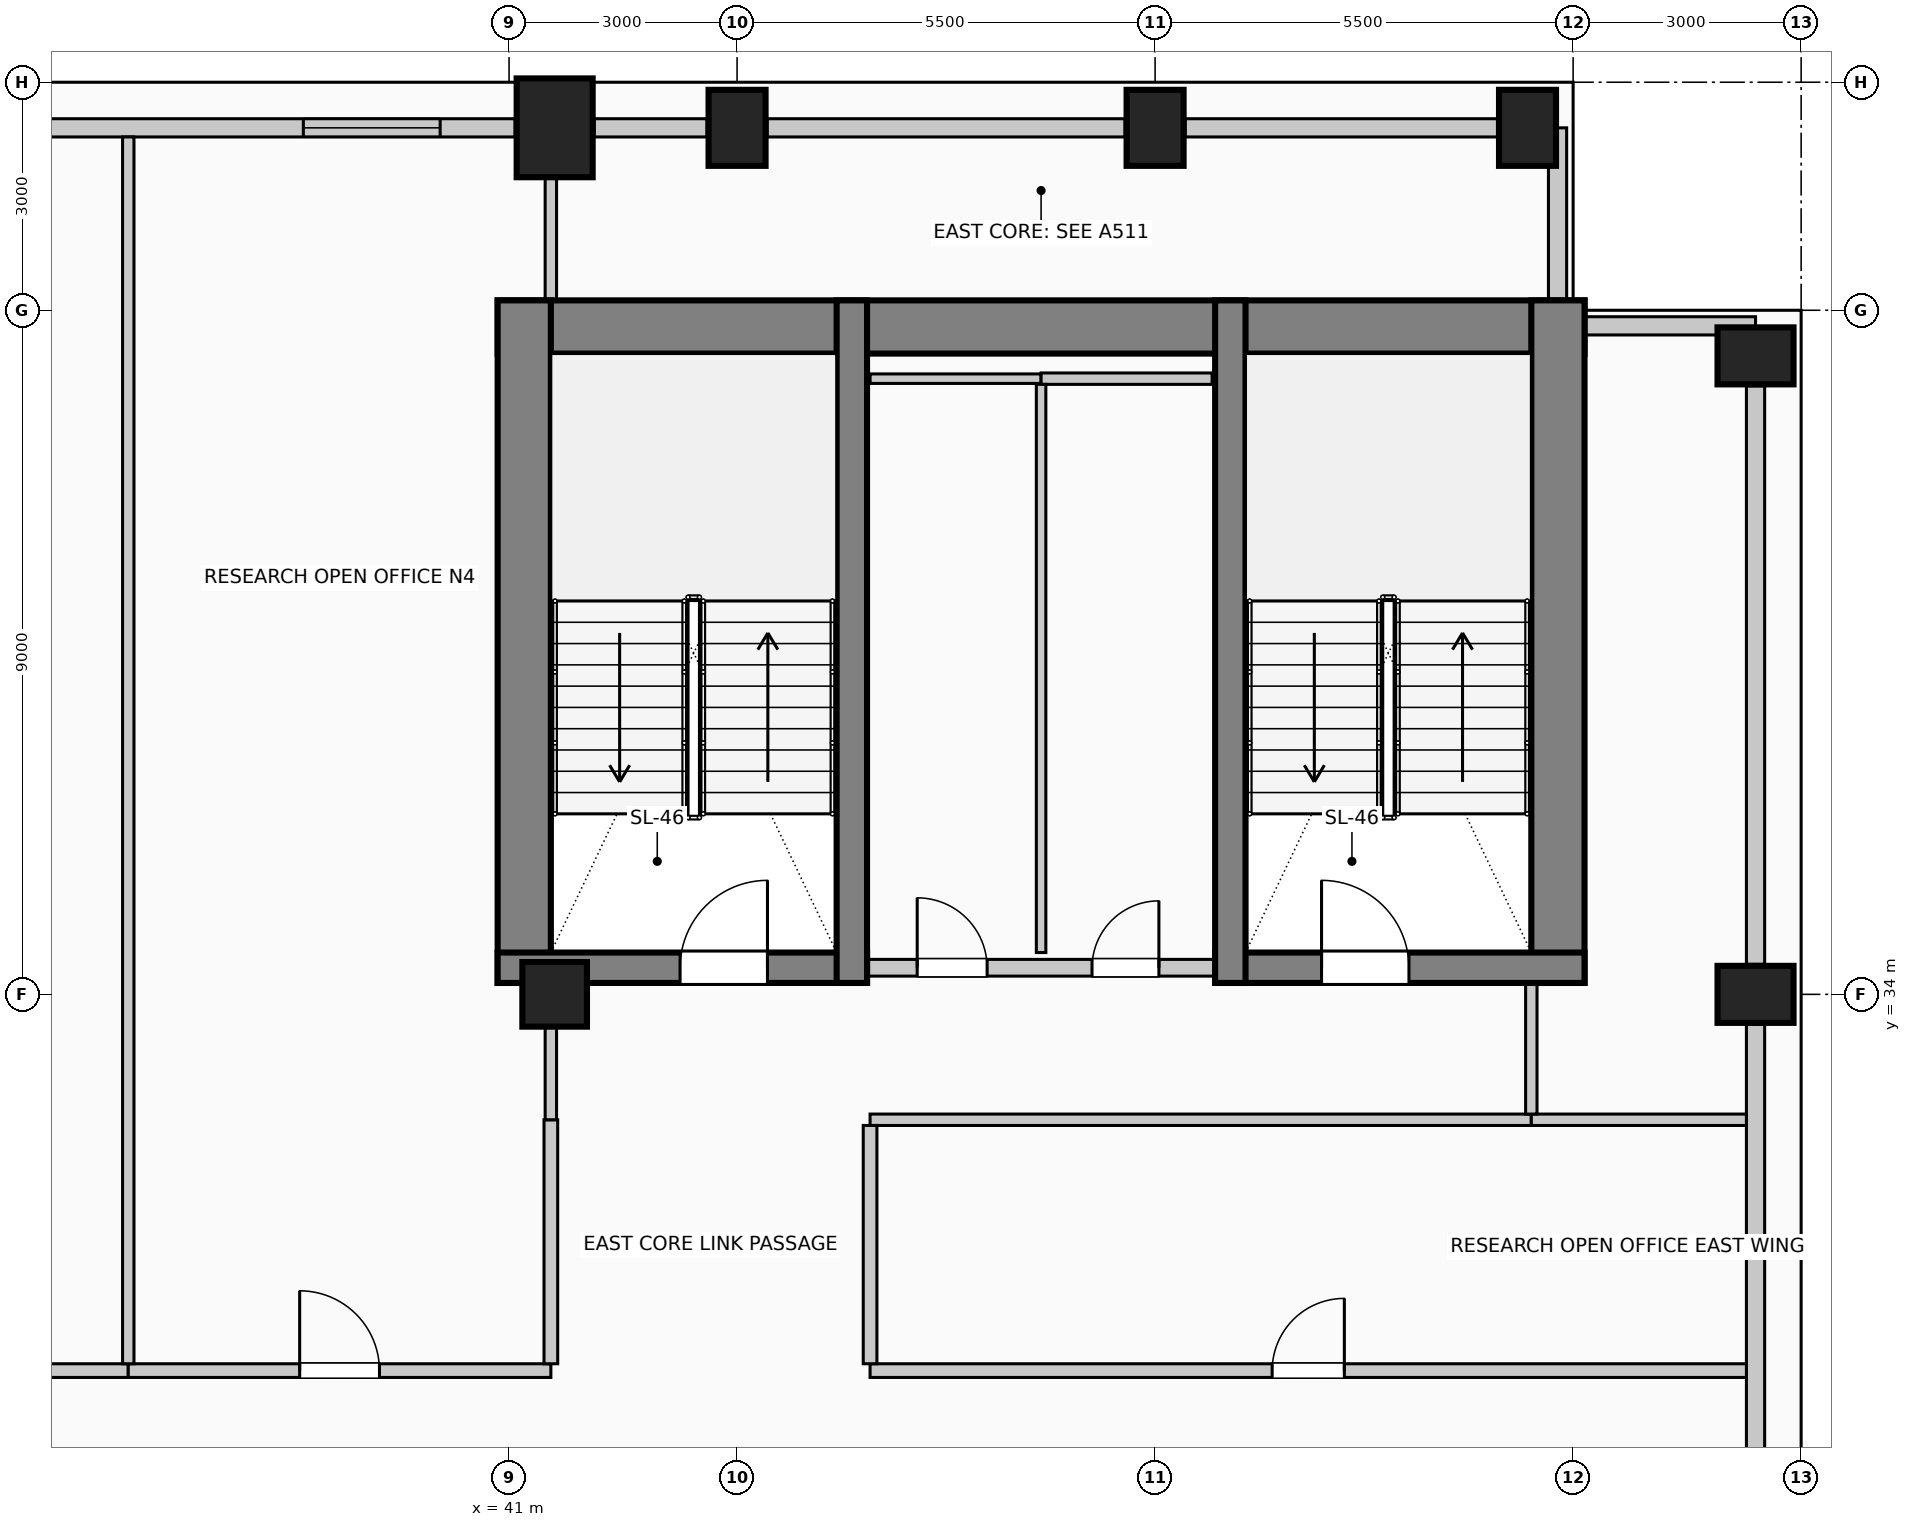
"""IFC4 building model, lengths in metres.
Left out: names, types, materials, properties, quantities, classifications, styles, units other than length and angle.
Written with IfcOpenShell. Run it as: python <this file> out.ifc"""

import sys

from ifc_helpers import new_model, si_unit, direction, frame, frame_2d, origin, origin_2d, place, context, subcontext, project, spatial, rectangle, circle, extrude, element, fill, save


model = new_model("IFC4")
c1 = context("Model", 3, precision=1e-05, world=origin(), true_north=direction((0.0, 1.0)))
c2 = subcontext(c1, "Body", "Model", "MODEL_VIEW")
j1 = project(units=[si_unit("LENGTHUNIT", "METRE"), si_unit("PLANEANGLEUNIT", "RADIAN")], contexts=[c1])
p1 = place(None, origin())
s1 = spatial("IfcSite", under=j1, at=p1, CompositionType="ELEMENT")
p2 = place(p1, origin())
s2 = spatial("IfcBuilding", under=s1, at=p2, CompositionType="ELEMENT")
p3 = place(p2, frame((0.0, 0.0, 222.6)))
s3 = spatial("IfcBuildingStorey", under=s2, at=p3, CompositionType="ELEMENT", Elevation=222.6)
p4 = place(p3, frame((40.85, 42.78, 0.0), z_axis=(0.0, 0.0, 1.0), x_axis=(1.0, 0.0, 0.0)))
e1 = element("IfcWall", 1, at=p4, inside=s3, PredefinedType="SHEAR", context=c2, shape_type="SweptSolid", body=[
    extrude(rectangle(XDim=14.3, YDim=0.7, at=frame_2d((7.15, 0.0))), origin(), (0.0, 0.0, 1.0), 4.0),
])
for number, where, z_axis, x_axis in (
    (2, (41.2, 34.15, 0.0), (0.0, 0.0, 1.0), (0.0, 1.0, 0.0)),
    (3, (54.8, 34.15, 0.0), (0.0, 0.0, 1.0), (0.0, 1.0, 0.0)),
):
    element("IfcWall", number, at=place(p3, frame(where, z_axis=z_axis, x_axis=x_axis)), inside=s3, PredefinedType="SHEAR", context=c2, shape_type="SweptSolid", body=[
        extrude(rectangle(XDim=8.98, YDim=0.7, at=frame_2d((4.49, 0.0))), origin(), (0.0, 0.0, 1.0), 4.0),
    ])
p5 = place(p3, frame((40.85, 34.35, 0.0), z_axis=(0.0, 0.0, 1.0), x_axis=(1.0, 0.0, 0.0)))
e4 = element("IfcWall", 4, at=p5, inside=s3, PredefinedType="SHEAR", context=c2, shape_type="SweptSolid", body=[
    extrude(rectangle(XDim=4.86, YDim=0.4, at=frame_2d((2.43, 0.0))), origin(), (0.0, 0.0, 1.0), 4.0),
])
p6 = place(p5, frame((2.4, 0.0, 0.0)))
e5 = element("IfcOpeningElement", 5, at=p6, cuts=e4, PredefinedType="OPENING", context=c2, shape_type="SweptSolid", body=[
    extrude(rectangle(XDim=1.15, YDim=2.2, at=frame_2d((0.575, 1.1))), frame((0.0, 0.21, 0.0), z_axis=(0.0, -1.0, 0.0), x_axis=(1.0, 0.0, 0.0)), (0.0, 0.0, 1.0), 0.42),
])
p7 = place(p3, frame((45.51, 34.15, 0.0), z_axis=(0.0, 0.0, 1.0), x_axis=(0.0, 1.0, 0.0)))
e6 = element("IfcWall", 6, at=p7, inside=s3, PredefinedType="SHEAR", context=c2, shape_type="SweptSolid", body=[
    extrude(rectangle(XDim=8.98, YDim=0.4, at=frame_2d((4.49, 0.0))), origin(), (0.0, 0.0, 1.0), 4.0),
])
p8 = place(p3, frame((50.29, 34.35, 0.0), z_axis=(0.0, 0.0, 1.0), x_axis=(1.0, 0.0, 0.0)))
e7 = element("IfcWall", 7, at=p8, inside=s3, PredefinedType="SHEAR", context=c2, shape_type="SweptSolid", body=[
    extrude(rectangle(XDim=4.86, YDim=0.4, at=frame_2d((2.43, 0.0))), origin(), (0.0, 0.0, 1.0), 4.0),
])
p9 = place(p8, frame((1.4, 0.0, 0.0)))
e8 = element("IfcOpeningElement", 8, at=p9, cuts=e7, PredefinedType="OPENING", context=c2, shape_type="SweptSolid", body=[
    extrude(rectangle(XDim=1.15, YDim=2.2, at=frame_2d((0.575, 1.1))), frame((0.0, 0.21, 0.0), z_axis=(0.0, -1.0, 0.0), x_axis=(1.0, 0.0, 0.0)), (0.0, 0.0, 1.0), 0.42),
])
p10 = place(p3, frame((50.49, 34.15, 0.0), z_axis=(0.0, 0.0, 1.0), x_axis=(0.0, 1.0, 0.0)))
e9 = element("IfcWall", 9, at=p10, inside=s3, PredefinedType="SHEAR", context=c2, shape_type="SweptSolid", body=[
    extrude(rectangle(XDim=8.98, YDim=0.4, at=frame_2d((4.49, 0.0))), origin(), (0.0, 0.0, 1.0), 4.0),
])
p11 = place(p3, frame((41.6, 45.4, 0.0), z_axis=(0.0, 0.0, 1.0), x_axis=(1.0, 0.0, 0.0)))
e10 = element("IfcColumn", 10, at=p11, inside=s3, PredefinedType="COLUMN", context=c2, shape_type="SweptSolid", body=[
    extrude(rectangle(XDim=1.0, YDim=1.3, at=origin_2d()), origin(), (0.0, 0.0, 1.0), 4.0),
])
for number, where, z_axis, x_axis in (
    (11, (44.0, 45.4, 0.0), (0.0, 0.0, 1.0), (1.0, 0.0, 0.0)),
    (12, (49.5, 45.4, 0.0), (0.0, 0.0, 1.0), (1.0, 0.0, 0.0)),
    (13, (54.4, 45.4, 0.0), (0.0, 0.0, 1.0), (1.0, 0.0, 0.0)),
    (14, (57.4, 34.0, 0.0), (0.0, 0.0, 1.0), (0.0, 1.0, 0.0)),
    (15, (57.4, 42.4, 0.0), (0.0, 0.0, 1.0), (0.0, 1.0, 0.0)),
):
    element("IfcColumn", number, at=place(p3, frame(where, z_axis=z_axis, x_axis=x_axis)), inside=s3, PredefinedType="COLUMN", context=c2, shape_type="SweptSolid", body=[
        extrude(rectangle(XDim=0.75, YDim=1.0, at=origin_2d()), origin(), (0.0, 0.0, 1.0), 4.0),
    ])
p12 = place(p3, frame((41.6, 34.0, 0.0), z_axis=(0.0, 0.0, 1.0), x_axis=(1.0, 0.0, 0.0)))
e16 = element("IfcColumn", 16, at=p12, inside=s3, PredefinedType="COLUMN", context=c2, shape_type="SweptSolid", body=[
    extrude(circle(Radius=0.425, at=origin_2d()), origin(), (0.0, 0.0, 1.0), 4.0),
])
p13 = place(p3, frame((34.52, 45.4, 0.0), z_axis=(0.0, 0.0, 1.0), x_axis=(1.0, 0.0, 0.0)))
e17 = element("IfcWall", 17, at=p13, inside=s3, PredefinedType="SOLIDWALL", context=c2, shape_type="SweptSolid", body=[
    extrude(rectangle(XDim=6.56, YDim=0.24, at=frame_2d((3.28, 0.0))), origin(), (0.0, 0.0, 1.0), 3.0),
])
p14 = place(p13, frame((3.773, 0.0, 0.42)))
e18 = element("IfcOpeningElement", 18, at=p14, cuts=e17, PredefinedType="OPENING", context=c2, shape_type="SweptSolid", body=[
    extrude(rectangle(XDim=1.8, YDim=2.2, at=frame_2d((0.9, 1.1))), frame((0.0, 0.13, 0.0), z_axis=(0.0, -1.0, 0.0), x_axis=(1.0, 0.0, 0.0)), (0.0, 0.0, 1.0), 0.26),
])
p15 = place(p3, frame((42.12, 45.4, 0.0), z_axis=(0.0, 0.0, 1.0), x_axis=(1.0, 0.0, 0.0)))
e19 = element("IfcWall", 19, at=p15, inside=s3, PredefinedType="SOLIDWALL", context=c2, shape_type="SweptSolid", body=[
    extrude(rectangle(XDim=1.485, YDim=0.24, at=frame_2d((0.742, 0.0))), origin(), (0.0, 0.0, 1.0), 3.0),
])
p16 = place(p3, frame((44.395, 45.4, 0.0), z_axis=(0.0, 0.0, 1.0), x_axis=(1.0, 0.0, 0.0)))
e20 = element("IfcWall", 20, at=p16, inside=s3, PredefinedType="SOLIDWALL", context=c2, shape_type="SweptSolid", body=[
    extrude(rectangle(XDim=4.71, YDim=0.24, at=frame_2d((2.355, 0.0))), origin(), (0.0, 0.0, 1.0), 3.0),
])
p17 = place(p3, frame((49.895, 45.4, 0.0), z_axis=(0.0, 0.0, 1.0), x_axis=(1.0, 0.0, 0.0)))
e21 = element("IfcWall", 21, at=p17, inside=s3, PredefinedType="SOLIDWALL", context=c2, shape_type="SweptSolid", body=[
    extrude(rectangle(XDim=4.11, YDim=0.24, at=frame_2d((2.055, 0.0))), origin(), (0.0, 0.0, 1.0), 3.0),
])
p18 = place(p3, frame((57.4, 33.605, 0.0), z_axis=(0.0, 0.0, 1.0), x_axis=(0.0, -1.0, 0.0)))
e22 = element("IfcWall", 22, at=p18, inside=s3, PredefinedType="SOLIDWALL", context=c2, shape_type="SweptSolid", body=[
    extrude(rectangle(XDim=7.21, YDim=0.24, at=frame_2d((3.605, 0.0))), origin(), (0.0, 0.0, 1.0), 3.0),
])
p19 = place(p3, frame((57.4, 42.005, 0.0), z_axis=(0.0, 0.0, 1.0), x_axis=(0.0, -1.0, 0.0)))
e23 = element("IfcWall", 23, at=p19, inside=s3, PredefinedType="SOLIDWALL", context=c2, shape_type="SweptSolid", body=[
    extrude(rectangle(XDim=7.61, YDim=0.24, at=frame_2d((3.805, 0.0))), origin(), (0.0, 0.0, 1.0), 3.0),
])
p20 = place(p3, frame((54.795, 45.4, 0.0), z_axis=(0.0, 0.0, 1.0), x_axis=(0.0, -1.0, 0.0)))
e24 = element("IfcWall", 24, at=p20, inside=s3, PredefinedType="SOLIDWALL", context=c2, shape_type="SweptSolid", body=[
    extrude(rectangle(XDim=2.265, YDim=0.24, at=frame_2d((1.132, 0.0))), origin(), (0.0, 0.0, 1.0), 3.75),
])
p21 = place(p3, frame((55.155, 42.795, 0.0), z_axis=(0.0, 0.0, 1.0), x_axis=(1.0, 0.0, 0.0)))
e25 = element("IfcWall", 25, at=p21, inside=s3, PredefinedType="SOLIDWALL", context=c2, shape_type="SweptSolid", body=[
    extrude(rectangle(XDim=2.245, YDim=0.24, at=frame_2d((1.123, 0.0))), origin(), (0.0, 0.0, 1.0), 3.75),
])
p22 = place(p3, frame((45.72, 34.35, 0.0), z_axis=(0.0, 0.0, 1.0), x_axis=(1.0, 0.0, 0.0)))
e26 = element("IfcWall", 26, at=p22, inside=s3, PredefinedType="PARTITIONING", context=c2, shape_type="SweptSolid", body=[
    extrude(rectangle(XDim=4.56, YDim=0.22, at=frame_2d((2.28, 0.0))), origin(), (0.0, 0.0, 1.0), 3.75),
])
p23 = place(p22, frame((0.65, 0.0, 0.0)))
e27 = element("IfcOpeningElement", 27, at=p23, cuts=e26, PredefinedType="OPENING", context=c2, shape_type="SweptSolid", body=[
    extrude(rectangle(XDim=0.92, YDim=2.1, at=frame_2d((0.46, 1.05))), frame((0.0, 0.12, 0.0), z_axis=(0.0, -1.0, 0.0), x_axis=(1.0, 0.0, 0.0)), (0.0, 0.0, 1.0), 0.24),
])
p24 = place(p22, frame((2.95, 0.0, 0.0)))
e28 = element("IfcOpeningElement", 28, at=p24, cuts=e26, PredefinedType="OPENING", context=c2, shape_type="SweptSolid", body=[
    extrude(rectangle(XDim=0.88, YDim=2.1, at=frame_2d((0.44, 1.05))), frame((0.0, 0.12, 0.0), z_axis=(0.0, -1.0, 0.0), x_axis=(1.0, 0.0, 0.0)), (0.0, 0.0, 1.0), 0.24),
])
p25 = place(p3, frame((32.33, 29.05, 0.0), z_axis=(0.0, 0.0, 1.0), x_axis=(1.0, 0.0, 0.0)))
e29 = element("IfcWall", 29, at=p25, inside=s3, PredefinedType="PARTITIONING", context=c2, shape_type="SweptSolid", body=[
    extrude(rectangle(XDim=3.66, YDim=0.18, at=frame_2d((1.83, 0.0))), origin(), (0.0, 0.0, 1.0), 3.75),
])
p26 = place(p25, frame((1.355, 0.0, 0.0)))
e30 = element("IfcOpeningElement", 30, at=p26, cuts=e29, PredefinedType="OPENING", context=c2, shape_type="SweptSolid", body=[
    extrude(rectangle(XDim=0.95, YDim=2.15, at=frame_2d((0.475, 1.075))), frame((0.0, 0.1, 0.0), z_axis=(0.0, -1.0, 0.0), x_axis=(1.0, 0.0, 0.0)), (0.0, 0.0, 1.0), 0.2),
])
p27 = place(p3, frame((35.99, 29.05, 0.0), z_axis=(0.0, 0.0, 1.0), x_axis=(1.0, 0.0, 0.0)))
e31 = element("IfcWall", 31, at=p27, inside=s3, PredefinedType="PARTITIONING", context=c2, shape_type="SweptSolid", body=[
    extrude(rectangle(XDim=5.56, YDim=0.18, at=frame_2d((2.78, 0.0))), origin(), (0.0, 0.0, 1.0), 3.75),
])
p28 = place(p27, frame((2.255, 0.0, 0.0)))
e32 = element("IfcOpeningElement", 32, at=p28, cuts=e31, PredefinedType="OPENING", context=c2, shape_type="SweptSolid", body=[
    extrude(rectangle(XDim=1.05, YDim=2.15, at=frame_2d((0.525, 1.075))), frame((0.0, 0.1, 0.0), z_axis=(0.0, -1.0, 0.0), x_axis=(1.0, 0.0, 0.0)), (0.0, 0.0, 1.0), 0.2),
])
p29 = place(p3, frame((45.75, 29.05, 0.0), z_axis=(0.0, 0.0, 1.0), x_axis=(1.0, 0.0, 0.0)))
e33 = element("IfcWall", 33, at=p29, inside=s3, PredefinedType="PARTITIONING", context=c2, shape_type="SweptSolid", body=[
    extrude(rectangle(XDim=11.53, YDim=0.18, at=frame_2d((5.765, 0.0))), origin(), (0.0, 0.0, 1.0), 3.75),
])
p30 = place(p29, frame((5.29, 0.0, 0.0)))
e34 = element("IfcOpeningElement", 34, at=p30, cuts=e33, PredefinedType="OPENING", context=c2, shape_type="SweptSolid", body=[
    extrude(rectangle(XDim=0.95, YDim=2.15, at=frame_2d((0.475, 1.075))), frame((0.0, 0.1, 0.0), z_axis=(0.0, -1.0, 0.0), x_axis=(1.0, 0.0, 0.0)), (0.0, 0.0, 1.0), 0.2),
])
p31 = place(p3, frame((45.75, 32.35, 0.0), z_axis=(0.0, 0.0, 1.0), x_axis=(1.0, 0.0, 0.0)))
e35 = element("IfcWall", 35, at=p31, inside=s3, PredefinedType="PARTITIONING", context=c2, shape_type="SweptSolid", body=[
    extrude(rectangle(XDim=8.7, YDim=0.15, at=frame_2d((4.35, 0.0))), origin(), (0.0, 0.0, 1.0), 3.75),
])
p32 = place(p3, frame((54.45, 32.35, 0.0), z_axis=(0.0, 0.0, 1.0), x_axis=(1.0, 0.0, 0.0)))
e36 = element("IfcWall", 36, at=p32, inside=s3, PredefinedType="PARTITIONING", context=c2, shape_type="SweptSolid", body=[
    extrude(rectangle(XDim=2.83, YDim=0.15, at=frame_2d((1.415, 0.0))), origin(), (0.0, 0.0, 1.0), 3.75),
])
p33 = place(p3, frame((45.75, 42.1, 0.0), z_axis=(0.0, 0.0, 1.0), x_axis=(1.0, 0.0, 0.0)))
e37 = element("IfcWall", 37, at=p33, inside=s3, PredefinedType="PARTITIONING", context=c2, shape_type="SweptSolid", body=[
    extrude(rectangle(XDim=2.25, YDim=0.125, at=frame_2d((1.125, 0.0))), origin(), (0.0, 0.0, 1.0), 3.75),
])
p34 = place(p3, frame((48.0, 42.1, 0.0), z_axis=(0.0, 0.0, 1.0), x_axis=(1.0, 0.0, 0.0)))
e38 = element("IfcWall", 38, at=p34, inside=s3, PredefinedType="PARTITIONING", context=c2, shape_type="SweptSolid", body=[
    extrude(rectangle(XDim=2.25, YDim=0.15, at=frame_2d((1.125, 0.0))), origin(), (0.0, 0.0, 1.0), 3.75),
])
p35 = place(p3, frame((35.99, 29.14, 0.0), z_axis=(0.0, 0.0, 1.0), x_axis=(0.0, 1.0, 0.0)))
e39 = element("IfcWall", 39, at=p35, inside=s3, PredefinedType="PARTITIONING", context=c2, shape_type="SweptSolid", body=[
    extrude(rectangle(XDim=16.14, YDim=0.15, at=frame_2d((8.07, 0.0))), origin(), (0.0, 0.0, 1.0), 3.75),
])
p36 = place(p3, frame((41.55, 29.14, 0.0), z_axis=(0.0, 0.0, 1.0), x_axis=(0.0, 1.0, 0.0)))
e40 = element("IfcWall", 40, at=p36, inside=s3, PredefinedType="PARTITIONING", context=c2, shape_type="SweptSolid", body=[
    extrude(rectangle(XDim=3.21, YDim=0.18, at=frame_2d((1.605, 0.0))), origin(), (0.0, 0.0, 1.0), 3.145),
])
p37 = place(p3, frame((41.55, 32.35, 0.0), z_axis=(0.0, 0.0, 1.0), x_axis=(0.0, 1.0, 0.0)))
e41 = element("IfcWall", 41, at=p37, inside=s3, PredefinedType="PARTITIONING", context=c2, shape_type="SweptSolid", body=[
    extrude(rectangle(XDim=1.225, YDim=0.15, at=frame_2d((0.612, 0.0))), origin(), (0.0, 0.0, 1.0), 3.145),
])
p38 = place(p3, frame((41.55, 43.13, 0.0), z_axis=(0.0, 0.0, 1.0), x_axis=(0.0, 1.0, 0.0)))
e42 = element("IfcWall", 42, at=p38, inside=s3, PredefinedType="PARTITIONING", context=c2, shape_type="SweptSolid", body=[
    extrude(rectangle(XDim=1.62, YDim=0.15, at=frame_2d((0.81, 0.0))), origin(), (0.0, 0.0, 1.0), 3.75),
])
p39 = place(p3, frame((45.75, 29.14, 0.0), z_axis=(0.0, 0.0, 1.0), x_axis=(0.0, 1.0, 0.0)))
e43 = element("IfcWall", 43, at=p39, inside=s3, PredefinedType="PARTITIONING", context=c2, shape_type="SweptSolid", body=[
    extrude(rectangle(XDim=3.135, YDim=0.18, at=frame_2d((1.567, 0.0))), origin(), (0.0, 0.0, 1.0), 3.75),
])
p40 = place(p3, frame((48.0, 34.55, 0.0), z_axis=(0.0, 0.0, 1.0), x_axis=(0.0, 1.0, 0.0)))
e44 = element("IfcWall", 44, at=p40, inside=s3, PredefinedType="PARTITIONING", context=c2, shape_type="SweptSolid", body=[
    extrude(rectangle(XDim=7.475, YDim=0.125, at=frame_2d((3.737, 0.0))), origin(), (0.0, 0.0, 1.0), 3.75),
])
p41 = place(p3, frame((54.45, 32.425, 0.0), z_axis=(0.0, 0.0, 1.0), x_axis=(0.0, 1.0, 0.0)))
e45 = element("IfcWall", 45, at=p41, inside=s3, PredefinedType="PARTITIONING", context=c2, shape_type="SweptSolid", body=[
    extrude(rectangle(XDim=1.725, YDim=0.15, at=frame_2d((0.862, 0.0))), origin(), (0.0, 0.0, 1.0), 3.75),
])
p42 = place(p14, origin())
e46 = element("IfcWindow", 46, at=p42, inside=s3, PartitioningType="SINGLE_PANEL", PredefinedType="WINDOW", context=c2, shape_type="SweptSolid", body=[
    extrude(rectangle(XDim=1.8, YDim=2.2, at=frame_2d((0.9, 1.1))), frame((0.0, 0.03, 0.0), z_axis=(0.0, -1.0, 0.0), x_axis=(1.0, 0.0, 0.0)), (0.0, 0.0, 1.0), 0.06),
])
fill(e18, e46)
p43 = place(p6, origin())
e47 = element("IfcDoor", 47, at=p43, inside=s3, OperationType="SINGLE_SWING_RIGHT", PredefinedType="DOOR", context=c2, shape_type="SweptSolid", body=[
    extrude(rectangle(XDim=1.15, YDim=2.2, at=frame_2d((0.575, 1.1))), frame((0.0, 0.025, 0.0), z_axis=(0.0, -1.0, 0.0), x_axis=(1.0, 0.0, 0.0)), (0.0, 0.0, 1.0), 0.05),
])
fill(e5, e47)
p44 = place(p23, origin())
e48 = element("IfcDoor", 48, at=p44, inside=s3, OperationType="SINGLE_SWING_LEFT", PredefinedType="DOOR", context=c2, shape_type="SweptSolid", body=[
    extrude(rectangle(XDim=0.92, YDim=2.1, at=frame_2d((0.46, 1.05))), frame((0.0, 0.025, 0.0), z_axis=(0.0, -1.0, 0.0), x_axis=(1.0, 0.0, 0.0)), (0.0, 0.0, 1.0), 0.05),
])
fill(e27, e48)
p45 = place(p24, origin())
e49 = element("IfcDoor", 49, at=p45, inside=s3, OperationType="SINGLE_SWING_RIGHT", PredefinedType="DOOR", context=c2, shape_type="SweptSolid", body=[
    extrude(rectangle(XDim=0.88, YDim=2.1, at=frame_2d((0.44, 1.05))), frame((0.0, 0.025, 0.0), z_axis=(0.0, -1.0, 0.0), x_axis=(1.0, 0.0, 0.0)), (0.0, 0.0, 1.0), 0.05),
])
fill(e28, e49)
p46 = place(p9, origin())
e50 = element("IfcDoor", 50, at=p46, inside=s3, OperationType="SINGLE_SWING_LEFT", PredefinedType="DOOR", context=c2, shape_type="SweptSolid", body=[
    extrude(rectangle(XDim=1.15, YDim=2.2, at=frame_2d((0.575, 1.1))), frame((0.0, 0.025, 0.0), z_axis=(0.0, -1.0, 0.0), x_axis=(1.0, 0.0, 0.0)), (0.0, 0.0, 1.0), 0.05),
])
fill(e8, e50)
p47 = place(p28, origin())
e51 = element("IfcDoor", 51, at=p47, inside=s3, OperationType="SINGLE_SWING_LEFT", PredefinedType="DOOR", context=c2, shape_type="SweptSolid", body=[
    extrude(rectangle(XDim=1.05, YDim=2.15, at=frame_2d((0.525, 1.075))), frame((0.0, 0.025, 0.0), z_axis=(0.0, -1.0, 0.0), x_axis=(1.0, 0.0, 0.0)), (0.0, 0.0, 1.0), 0.05),
])
fill(e32, e51)
p48 = place(p30, origin())
e52 = element("IfcDoor", 52, at=p48, inside=s3, OperationType="SINGLE_SWING_RIGHT", PredefinedType="DOOR", context=c2, shape_type="SweptSolid", body=[
    extrude(rectangle(XDim=0.95, YDim=2.15, at=frame_2d((0.475, 1.075))), frame((0.0, 0.025, 0.0), z_axis=(0.0, -1.0, 0.0), x_axis=(1.0, 0.0, 0.0)), (0.0, 0.0, 1.0), 0.05),
])
fill(e34, e52)
save(model, sys.argv[1])
